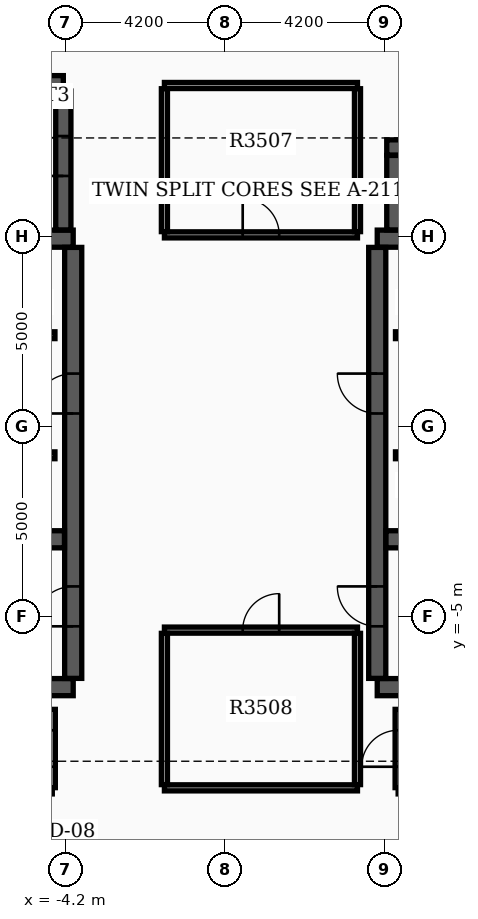
"""IFC4 building model, lengths in metres.
Left out: names, types, materials, properties, quantities, classifications, styles, units other than length and angle.
Written with IfcOpenShell. Run it as: python <this file> out.ifc"""

import sys

from ifc_helpers import new_model, si_unit, direction, frame, frame_2d, origin, place, context, subcontext, project, spatial, rectangle, extrude, element, fill, save


model = new_model("IFC4")
c1 = context("Model", 3, precision=1e-05, world=origin(), true_north=direction((0.0, 1.0)))
c2 = subcontext(c1, "Body", "Model", "MODEL_VIEW")
j1 = project(units=[si_unit("LENGTHUNIT", "METRE"), si_unit("PLANEANGLEUNIT", "RADIAN")], contexts=[c1])
p1 = place(None, origin())
s1 = spatial("IfcSite", under=j1, at=p1, CompositionType="ELEMENT")
p2 = place(p1, origin())
s2 = spatial("IfcBuilding", under=s1, at=p2, CompositionType="ELEMENT")
p3 = place(p2, frame((0.0, 0.0, 220.8)))
s3 = spatial("IfcBuildingStorey", under=s2, at=p3, CompositionType="ELEMENT", Elevation=220.8)
for number, where, z_axis, x_axis in (
    (1, (-12.4, -6.85, 0.0), (0.0, 0.0, 1.0), (1.0, 0.0, 0.0)),
    (2, (-12.4, 4.95, 0.0), (0.0, 0.0, 1.0), (1.0, 0.0, 0.0)),
):
    element("IfcWall", number, at=place(p3, frame(where, z_axis=z_axis, x_axis=x_axis)), inside=s3, PredefinedType="SHEAR", context=c2, shape_type="SweptSolid", body=[
        extrude(rectangle(XDim=8.4, YDim=0.45, at=frame_2d((4.2, 0.0))), origin(), (0.0, 0.0, 1.0), 3.7),
    ])
p4 = place(p3, frame((-4.0, -6.62, 0.0), z_axis=(0.0, 0.0, 1.0), x_axis=(0.0, 1.0, 0.0)))
e3 = element("IfcWall", 3, at=p4, inside=s3, PredefinedType="SHEAR", context=c2, shape_type="SweptSolid", body=[
    extrude(rectangle(XDim=11.34, YDim=0.45, at=frame_2d((5.67, 0.0))), origin(), (0.0, 0.0, 1.0), 3.7),
])
p5 = place(p4, frame((1.37, 0.0, 0.0)))
e4 = element("IfcOpeningElement", 4, at=p5, cuts=e3, PredefinedType="OPENING", context=c2, shape_type="SweptSolid", body=[
    extrude(rectangle(XDim=1.05, YDim=2.15, at=frame_2d((0.525, 1.075))), frame((0.0, 0.235, 0.0), z_axis=(0.0, -1.0, 0.0), x_axis=(1.0, 0.0, 0.0)), (0.0, 0.0, 1.0), 0.47),
])
p6 = place(p4, frame((6.97, 0.0, 0.0)))
e5 = element("IfcOpeningElement", 5, at=p6, cuts=e3, PredefinedType="OPENING", context=c2, shape_type="SweptSolid", body=[
    extrude(rectangle(XDim=1.05, YDim=2.15, at=frame_2d((0.525, 1.075))), frame((0.0, 0.235, 0.0), z_axis=(0.0, -1.0, 0.0), x_axis=(1.0, 0.0, 0.0)), (0.0, 0.0, 1.0), 0.47),
])
p7 = place(p3, frame((-12.17, -2.96, 0.0), z_axis=(0.0, 0.0, 1.0), x_axis=(1.0, 0.0, 0.0)))
e6 = element("IfcWall", 6, at=p7, inside=s3, PredefinedType="SHEAR", context=c2, shape_type="SweptSolid", body=[
    extrude(rectangle(XDim=7.94, YDim=0.45, at=frame_2d((3.97, 0.0))), origin(), (0.0, 0.0, 1.0), 3.7),
])
for number, where, z_axis, x_axis in (
    (7, (4.0, -6.85, 0.0), (0.0, 0.0, 1.0), (1.0, 0.0, 0.0)),
    (8, (4.0, 4.95, 0.0), (0.0, 0.0, 1.0), (1.0, 0.0, 0.0)),
):
    element("IfcWall", number, at=place(p3, frame(where, z_axis=z_axis, x_axis=x_axis)), inside=s3, PredefinedType="SHEAR", context=c2, shape_type="SweptSolid", body=[
        extrude(rectangle(XDim=8.4, YDim=0.45, at=frame_2d((4.2, 0.0))), origin(), (0.0, 0.0, 1.0), 3.7),
    ])
p8 = place(p3, frame((4.0, -6.62, 0.0), z_axis=(0.0, 0.0, 1.0), x_axis=(0.0, 1.0, 0.0)))
e9 = element("IfcWall", 9, at=p8, inside=s3, PredefinedType="SHEAR", context=c2, shape_type="SweptSolid", body=[
    extrude(rectangle(XDim=11.34, YDim=0.45, at=frame_2d((5.67, 0.0))), origin(), (0.0, 0.0, 1.0), 3.7),
])
p9 = place(p8, frame((1.37, 0.0, 0.0)))
e10 = element("IfcOpeningElement", 10, at=p9, cuts=e9, PredefinedType="OPENING", context=c2, shape_type="SweptSolid", body=[
    extrude(rectangle(XDim=1.05, YDim=2.15, at=frame_2d((0.525, 1.075))), frame((0.0, 0.235, 0.0), z_axis=(0.0, -1.0, 0.0), x_axis=(1.0, 0.0, 0.0)), (0.0, 0.0, 1.0), 0.47),
])
p10 = place(p8, frame((6.97, 0.0, 0.0)))
e11 = element("IfcOpeningElement", 11, at=p10, cuts=e9, PredefinedType="OPENING", context=c2, shape_type="SweptSolid", body=[
    extrude(rectangle(XDim=1.05, YDim=2.15, at=frame_2d((0.525, 1.075))), frame((0.0, 0.235, 0.0), z_axis=(0.0, -1.0, 0.0), x_axis=(1.0, 0.0, 0.0)), (0.0, 0.0, 1.0), 0.47),
])
p11 = place(p3, frame((4.23, -2.96, 0.0), z_axis=(0.0, 0.0, 1.0), x_axis=(1.0, 0.0, 0.0)))
e12 = element("IfcWall", 12, at=p11, inside=s3, PredefinedType="SHEAR", context=c2, shape_type="SweptSolid", body=[
    extrude(rectangle(XDim=7.94, YDim=0.45, at=frame_2d((3.97, 0.0))), origin(), (0.0, 0.0, 1.0), 3.7),
])
p12 = place(p3, frame((-12.22, 9.04, 0.0), z_axis=(0.0, 0.0, 1.0), x_axis=(1.0, 0.0, 0.0)))
e13 = element("IfcWall", 13, at=p12, inside=s3, PredefinedType="SHEAR", context=c2, shape_type="SweptSolid", body=[
    extrude(rectangle(XDim=7.96, YDim=0.4, at=frame_2d((3.98, 0.0))), origin(), (0.0, 0.0, 1.0), 3.7),
])
p13 = place(p3, frame((-4.26, 5.18, 0.0), z_axis=(0.0, 0.0, 1.0), x_axis=(0.0, 1.0, 0.0)))
e14 = element("IfcWall", 14, at=p13, inside=s3, PredefinedType="SHEAR", context=c2, shape_type="SweptSolid", body=[
    extrude(rectangle(XDim=3.655, YDim=0.4, at=frame_2d((1.828, 0.0))), origin(), (0.0, 0.0, 1.0), 3.7),
])
p14 = place(p13, frame((1.42, 0.0, 0.0)))
e15 = element("IfcOpeningElement", 15, at=p14, cuts=e14, PredefinedType="OPENING", context=c2, shape_type="SweptSolid", body=[
    extrude(rectangle(XDim=1.05, YDim=2.15, at=frame_2d((0.525, 1.075))), frame((0.0, 0.21, 0.0), z_axis=(0.0, -1.0, 0.0), x_axis=(1.0, 0.0, 0.0)), (0.0, 0.0, 1.0), 0.42),
])
p15 = place(p3, frame((4.45, 5.18, 0.0), z_axis=(0.0, 0.0, 1.0), x_axis=(0.0, 1.0, 0.0)))
e16 = element("IfcWall", 16, at=p15, inside=s3, PredefinedType="SHEAR", context=c2, shape_type="SweptSolid", body=[
    extrude(rectangle(XDim=1.96, YDim=0.4, at=frame_2d((0.98, 0.0))), origin(), (0.0, 0.0, 1.0), 3.7),
])
p16 = place(p3, frame((4.25, 7.35, 0.0), z_axis=(0.0, 0.0, 1.0), x_axis=(1.0, 0.0, 0.0)))
e17 = element("IfcWall", 17, at=p16, inside=s3, PredefinedType="SHEAR", context=c2, shape_type="SweptSolid", body=[
    extrude(rectangle(XDim=5.4, YDim=0.4, at=frame_2d((2.7, 0.0))), origin(), (0.0, 0.0, 1.0), 3.7),
])
p17 = place(p3, frame((-11.9, 2.41, 0.0), z_axis=(0.0, 0.0, 1.0), x_axis=(1.0, 0.0, 0.0)))
e18 = element("IfcWall", 18, at=p17, inside=s3, PredefinedType="SOLIDWALL", context=c2, shape_type="SweptSolid", body=[
    extrude(rectangle(XDim=7.42, YDim=0.18, at=frame_2d((3.71, 0.0))), origin(), (0.0, 0.0, 1.0), 3.17),
])
p18 = place(p17, frame((0.55, 0.0, 0.0)))
e19 = element("IfcOpeningElement", 19, at=p18, cuts=e18, PredefinedType="OPENING", context=c2, shape_type="SweptSolid", body=[
    extrude(rectangle(XDim=1.1, YDim=2.15, at=frame_2d((0.55, 1.075))), frame((0.0, 0.1, 0.0), z_axis=(0.0, -1.0, 0.0), x_axis=(1.0, 0.0, 0.0)), (0.0, 0.0, 1.0), 0.2),
])
p19 = place(p17, frame((4.9, 0.0, 0.0)))
e20 = element("IfcOpeningElement", 20, at=p19, cuts=e18, PredefinedType="OPENING", context=c2, shape_type="SweptSolid", body=[
    extrude(rectangle(XDim=0.88, YDim=2.1, at=frame_2d((0.44, 1.05))), frame((0.0, 0.1, 0.0), z_axis=(0.0, -1.0, 0.0), x_axis=(1.0, 0.0, 0.0)), (0.0, 0.0, 1.0), 0.2),
])
p20 = place(p3, frame((4.48, 2.41, 0.0), z_axis=(0.0, 0.0, 1.0), x_axis=(1.0, 0.0, 0.0)))
e21 = element("IfcWall", 21, at=p20, inside=s3, PredefinedType="SOLIDWALL", context=c2, shape_type="SweptSolid", body=[
    extrude(rectangle(XDim=7.42, YDim=0.18, at=frame_2d((3.71, 0.0))), origin(), (0.0, 0.0, 1.0), 3.17),
])
p21 = place(p20, frame((5.67, 0.0, 0.0)))
e22 = element("IfcOpeningElement", 22, at=p21, cuts=e21, PredefinedType="OPENING", context=c2, shape_type="SweptSolid", body=[
    extrude(rectangle(XDim=1.1, YDim=2.15, at=frame_2d((0.55, 1.075))), frame((0.0, 0.1, 0.0), z_axis=(0.0, -1.0, 0.0), x_axis=(1.0, 0.0, 0.0)), (0.0, 0.0, 1.0), 0.2),
])
p22 = place(p20, frame((1.6, 0.0, 0.0)))
e23 = element("IfcOpeningElement", 23, at=p22, cuts=e21, PredefinedType="OPENING", context=c2, shape_type="SweptSolid", body=[
    extrude(rectangle(XDim=0.88, YDim=2.1, at=frame_2d((0.44, 1.05))), frame((0.0, 0.1, 0.0), z_axis=(0.0, -1.0, 0.0), x_axis=(1.0, 0.0, 0.0)), (0.0, 0.0, 1.0), 0.2),
])
p23 = place(p3, frame((-11.9, -0.75, 0.0), z_axis=(0.0, 0.0, 1.0), x_axis=(1.0, 0.0, 0.0)))
e24 = element("IfcWall", 24, at=p23, inside=s3, PredefinedType="SOLIDWALL", context=c2, shape_type="SweptSolid", body=[
    extrude(rectangle(XDim=7.42, YDim=0.18, at=frame_2d((3.71, 0.0))), origin(), (0.0, 0.0, 1.0), 3.17),
])
p24 = place(p23, frame((5.75, 0.0, 0.0)))
e25 = element("IfcOpeningElement", 25, at=p24, cuts=e24, PredefinedType="OPENING", context=c2, shape_type="SweptSolid", body=[
    extrude(rectangle(XDim=1.1, YDim=2.15, at=frame_2d((0.55, 1.075))), frame((0.0, 0.1, 0.0), z_axis=(0.0, -1.0, 0.0), x_axis=(1.0, 0.0, 0.0)), (0.0, 0.0, 1.0), 0.2),
])
p25 = place(p23, frame((1.6, 0.0, 0.0)))
e26 = element("IfcOpeningElement", 26, at=p25, cuts=e24, PredefinedType="OPENING", context=c2, shape_type="SweptSolid", body=[
    extrude(rectangle(XDim=0.88, YDim=2.1, at=frame_2d((0.44, 1.05))), frame((0.0, 0.1, 0.0), z_axis=(0.0, -1.0, 0.0), x_axis=(1.0, 0.0, 0.0)), (0.0, 0.0, 1.0), 0.2),
])
p26 = place(p3, frame((4.48, -0.75, 0.0), z_axis=(0.0, 0.0, 1.0), x_axis=(1.0, 0.0, 0.0)))
e27 = element("IfcWall", 27, at=p26, inside=s3, PredefinedType="SOLIDWALL", context=c2, shape_type="SweptSolid", body=[
    extrude(rectangle(XDim=7.42, YDim=0.18, at=frame_2d((3.71, 0.0))), origin(), (0.0, 0.0, 1.0), 3.17),
])
p27 = place(p26, frame((3.92, 0.0, 0.0)))
e28 = element("IfcOpeningElement", 28, at=p27, cuts=e27, PredefinedType="OPENING", context=c2, shape_type="SweptSolid", body=[
    extrude(rectangle(XDim=1.1, YDim=2.15, at=frame_2d((0.55, 1.075))), frame((0.0, 0.1, 0.0), z_axis=(0.0, -1.0, 0.0), x_axis=(1.0, 0.0, 0.0)), (0.0, 0.0, 1.0), 0.2),
])
p28 = place(p26, frame((5.82, 0.0, 0.0)))
e29 = element("IfcOpeningElement", 29, at=p28, cuts=e27, PredefinedType="OPENING", context=c2, shape_type="SweptSolid", body=[
    extrude(rectangle(XDim=1.1, YDim=2.15, at=frame_2d((0.55, 1.075))), frame((0.0, 0.1, 0.0), z_axis=(0.0, -1.0, 0.0), x_axis=(1.0, 0.0, 0.0)), (0.0, 0.0, 1.0), 0.2),
])
p29 = place(p26, frame((1.6, 0.0, 0.0)))
e30 = element("IfcOpeningElement", 30, at=p29, cuts=e27, PredefinedType="OPENING", context=c2, shape_type="SweptSolid", body=[
    extrude(rectangle(XDim=0.88, YDim=2.1, at=frame_2d((0.44, 1.05))), frame((0.0, 0.1, 0.0), z_axis=(0.0, -1.0, 0.0), x_axis=(1.0, 0.0, 0.0)), (0.0, 0.0, 1.0), 0.2),
])
p30 = place(p3, frame((-1.6, 5.05, 0.0), z_axis=(0.0, 0.0, 1.0), x_axis=(1.0, 0.0, 0.0)))
e31 = element("IfcWall", 31, at=p30, inside=s3, PredefinedType="PARTITIONING", context=c2, shape_type="SweptSolid", body=[
    extrude(rectangle(XDim=5.08, YDim=0.16, at=frame_2d((2.54, 0.0))), origin(), (0.0, 0.0, 1.0), 3.17),
])
p31 = place(p30, frame((2.06, 0.0, 0.0)))
e32 = element("IfcOpeningElement", 32, at=p31, cuts=e31, PredefinedType="OPENING", context=c2, shape_type="SweptSolid", body=[
    extrude(rectangle(XDim=0.96, YDim=2.15, at=frame_2d((0.48, 1.075))), frame((0.0, 0.09, 0.0), z_axis=(0.0, -1.0, 0.0), x_axis=(1.0, 0.0, 0.0)), (0.0, 0.0, 1.0), 0.18),
])
p32 = place(p3, frame((-1.6, 8.98, 0.0), z_axis=(0.0, 0.0, 1.0), x_axis=(1.0, 0.0, 0.0)))
e33 = element("IfcWall", 33, at=p32, inside=s3, PredefinedType="PARTITIONING", context=c2, shape_type="SweptSolid", body=[
    extrude(rectangle(XDim=5.08, YDim=0.16, at=frame_2d((2.54, 0.0))), origin(), (0.0, 0.0, 1.0), 3.17),
])
for number, where, z_axis, x_axis in (
    (34, (-1.6, 5.135, 0.0), (0.0, 0.0, 1.0), (0.0, 1.0, 0.0)),
    (35, (3.48, 5.135, 0.0), (0.0, 0.0, 1.0), (0.0, 1.0, 0.0)),
):
    element("IfcWall", number, at=place(p3, frame(where, z_axis=z_axis, x_axis=x_axis)), inside=s3, PredefinedType="PARTITIONING", context=c2, shape_type="SweptSolid", body=[
        extrude(rectangle(XDim=3.76, YDim=0.16, at=frame_2d((1.88, 0.0))), origin(), (0.0, 0.0, 1.0), 3.17),
    ])
p33 = place(p3, frame((-1.6, -9.5, 0.0), z_axis=(0.0, 0.0, 1.0), x_axis=(1.0, 0.0, 0.0)))
e36 = element("IfcWall", 36, at=p33, inside=s3, PredefinedType="PARTITIONING", context=c2, shape_type="SweptSolid", body=[
    extrude(rectangle(XDim=5.08, YDim=0.16, at=frame_2d((2.54, 0.0))), origin(), (0.0, 0.0, 1.0), 3.17),
])
p34 = place(p3, frame((-1.6, -5.35, 0.0), z_axis=(0.0, 0.0, 1.0), x_axis=(1.0, 0.0, 0.0)))
e37 = element("IfcWall", 37, at=p34, inside=s3, PredefinedType="PARTITIONING", context=c2, shape_type="SweptSolid", body=[
    extrude(rectangle(XDim=5.08, YDim=0.16, at=frame_2d((2.54, 0.0))), origin(), (0.0, 0.0, 1.0), 3.17),
])
p35 = place(p34, frame((2.06, 0.0, 0.0)))
e38 = element("IfcOpeningElement", 38, at=p35, cuts=e37, PredefinedType="OPENING", context=c2, shape_type="SweptSolid", body=[
    extrude(rectangle(XDim=0.96, YDim=2.15, at=frame_2d((0.48, 1.075))), frame((0.0, 0.09, 0.0), z_axis=(0.0, -1.0, 0.0), x_axis=(1.0, 0.0, 0.0)), (0.0, 0.0, 1.0), 0.18),
])
for number, where, z_axis, x_axis in (
    (39, (-1.6, -9.415, 0.0), (0.0, 0.0, 1.0), (0.0, 1.0, 0.0)),
    (40, (3.48, -9.415, 0.0), (0.0, 0.0, 1.0), (0.0, 1.0, 0.0)),
):
    element("IfcWall", number, at=place(p3, frame(where, z_axis=z_axis, x_axis=x_axis)), inside=s3, PredefinedType="PARTITIONING", context=c2, shape_type="SweptSolid", body=[
        extrude(rectangle(XDim=3.98, YDim=0.16, at=frame_2d((1.99, 0.0))), origin(), (0.0, 0.0, 1.0), 3.17),
    ])
p36 = place(p3, frame((4.55, -9.58, 0.0), z_axis=(0.0, 0.0, 1.0), x_axis=(1.0, 0.0, 0.0)))
e41 = element("IfcWall", 41, at=p36, inside=s3, PredefinedType="PARTITIONING", context=c2, shape_type="SweptSolid", body=[
    extrude(rectangle(XDim=8.1, YDim=0.16, at=frame_2d((4.05, 0.0))), origin(), (0.0, 0.0, 1.0), 3.17),
])
p37 = place(p3, frame((4.55, -9.495, 0.0), z_axis=(0.0, 0.0, 1.0), x_axis=(0.0, 1.0, 0.0)))
e42 = element("IfcWall", 42, at=p37, inside=s3, PredefinedType="PARTITIONING", context=c2, shape_type="SweptSolid", body=[
    extrude(rectangle(XDim=2.06, YDim=0.16, at=frame_2d((1.03, 0.0))), origin(), (0.0, 0.0, 1.0), 3.17),
])
p38 = place(p37, frame((0.55, 0.0, 0.0)))
e43 = element("IfcOpeningElement", 43, at=p38, cuts=e42, PredefinedType="OPENING", context=c2, shape_type="SweptSolid", body=[
    extrude(rectangle(XDim=0.96, YDim=2.15, at=frame_2d((0.48, 1.075))), frame((0.0, 0.09, 0.0), z_axis=(0.0, -1.0, 0.0), x_axis=(1.0, 0.0, 0.0)), (0.0, 0.0, 1.0), 0.18),
])
p39 = place(p3, frame((-4.55, -9.495, 0.0), z_axis=(0.0, 0.0, 1.0), x_axis=(0.0, 1.0, 0.0)))
e44 = element("IfcWall", 44, at=p39, inside=s3, PredefinedType="PARTITIONING", context=c2, shape_type="SweptSolid", body=[
    extrude(rectangle(XDim=2.06, YDim=0.16, at=frame_2d((1.03, 0.0))), origin(), (0.0, 0.0, 1.0), 3.17),
])
p40 = place(p39, frame((0.55, 0.0, 0.0)))
e45 = element("IfcOpeningElement", 45, at=p40, cuts=e44, PredefinedType="OPENING", context=c2, shape_type="SweptSolid", body=[
    extrude(rectangle(XDim=0.96, YDim=2.15, at=frame_2d((0.48, 1.075))), frame((0.0, 0.09, 0.0), z_axis=(0.0, -1.0, 0.0), x_axis=(1.0, 0.0, 0.0)), (0.0, 0.0, 1.0), 0.18),
])
p41 = place(p5, origin())
e46 = element("IfcDoor", 46, at=p41, inside=s3, OperationType="SINGLE_SWING_LEFT", PredefinedType="DOOR", context=c2, shape_type="SweptSolid", body=[
    extrude(rectangle(XDim=1.05, YDim=2.15, at=frame_2d((0.525, 1.075))), frame((0.0, 0.025, 0.0), z_axis=(0.0, -1.0, 0.0), x_axis=(1.0, 0.0, 0.0)), (0.0, 0.0, 1.0), 0.05),
])
fill(e4, e46)
p42 = place(p9, origin())
e47 = element("IfcDoor", 47, at=p42, inside=s3, OperationType="SINGLE_SWING_RIGHT", PredefinedType="DOOR", context=c2, shape_type="SweptSolid", body=[
    extrude(rectangle(XDim=1.05, YDim=2.15, at=frame_2d((0.525, 1.075))), frame((0.0, 0.025, 0.0), z_axis=(0.0, -1.0, 0.0), x_axis=(1.0, 0.0, 0.0)), (0.0, 0.0, 1.0), 0.05),
])
fill(e10, e47)
p43 = place(p6, origin())
e48 = element("IfcDoor", 48, at=p43, inside=s3, OperationType="SINGLE_SWING_LEFT", PredefinedType="DOOR", context=c2, shape_type="SweptSolid", body=[
    extrude(rectangle(XDim=1.05, YDim=2.15, at=frame_2d((0.525, 1.075))), frame((0.0, 0.025, 0.0), z_axis=(0.0, -1.0, 0.0), x_axis=(1.0, 0.0, 0.0)), (0.0, 0.0, 1.0), 0.05),
])
fill(e5, e48)
p44 = place(p10, origin())
e49 = element("IfcDoor", 49, at=p44, inside=s3, OperationType="SINGLE_SWING_RIGHT", PredefinedType="DOOR", context=c2, shape_type="SweptSolid", body=[
    extrude(rectangle(XDim=1.05, YDim=2.15, at=frame_2d((0.525, 1.075))), frame((0.0, 0.025, 0.0), z_axis=(0.0, -1.0, 0.0), x_axis=(1.0, 0.0, 0.0)), (0.0, 0.0, 1.0), 0.05),
])
fill(e11, e49)
p45 = place(p14, origin())
e50 = element("IfcDoor", 50, at=p45, inside=s3, OperationType="SINGLE_SWING_LEFT", PredefinedType="DOOR", context=c2, shape_type="SweptSolid", body=[
    extrude(rectangle(XDim=1.05, YDim=2.15, at=frame_2d((0.525, 1.075))), frame((0.0, 0.025, 0.0), z_axis=(0.0, -1.0, 0.0), x_axis=(1.0, 0.0, 0.0)), (0.0, 0.0, 1.0), 0.05),
])
fill(e15, e50)
p46 = place(p31, origin())
e51 = element("IfcDoor", 51, at=p46, inside=s3, OperationType="SINGLE_SWING_LEFT", PredefinedType="DOOR", context=c2, shape_type="SweptSolid", body=[
    extrude(rectangle(XDim=0.96, YDim=2.15, at=frame_2d((0.48, 1.075))), frame((0.0, 0.025, 0.0), z_axis=(0.0, -1.0, 0.0), x_axis=(1.0, 0.0, 0.0)), (0.0, 0.0, 1.0), 0.05),
])
fill(e32, e51)
p47 = place(p35, origin())
e52 = element("IfcDoor", 52, at=p47, inside=s3, OperationType="SINGLE_SWING_RIGHT", PredefinedType="DOOR", context=c2, shape_type="SweptSolid", body=[
    extrude(rectangle(XDim=0.96, YDim=2.15, at=frame_2d((0.48, 1.075))), frame((0.0, 0.025, 0.0), z_axis=(0.0, -1.0, 0.0), x_axis=(1.0, 0.0, 0.0)), (0.0, 0.0, 1.0), 0.05),
])
fill(e38, e52)
p48 = place(p38, origin())
e53 = element("IfcDoor", 53, at=p48, inside=s3, OperationType="SINGLE_SWING_LEFT", PredefinedType="DOOR", context=c2, shape_type="SweptSolid", body=[
    extrude(rectangle(XDim=0.96, YDim=2.15, at=frame_2d((0.48, 1.075))), frame((0.0, 0.025, 0.0), z_axis=(0.0, -1.0, 0.0), x_axis=(1.0, 0.0, 0.0)), (0.0, 0.0, 1.0), 0.05),
])
fill(e43, e53)
p49 = place(p40, origin())
e54 = element("IfcDoor", 54, at=p49, inside=s3, OperationType="SINGLE_SWING_RIGHT", PredefinedType="DOOR", context=c2, shape_type="SweptSolid", body=[
    extrude(rectangle(XDim=0.96, YDim=2.15, at=frame_2d((0.48, 1.075))), frame((0.0, 0.025, 0.0), z_axis=(0.0, -1.0, 0.0), x_axis=(1.0, 0.0, 0.0)), (0.0, 0.0, 1.0), 0.05),
])
fill(e45, e54)
save(model, sys.argv[1])
